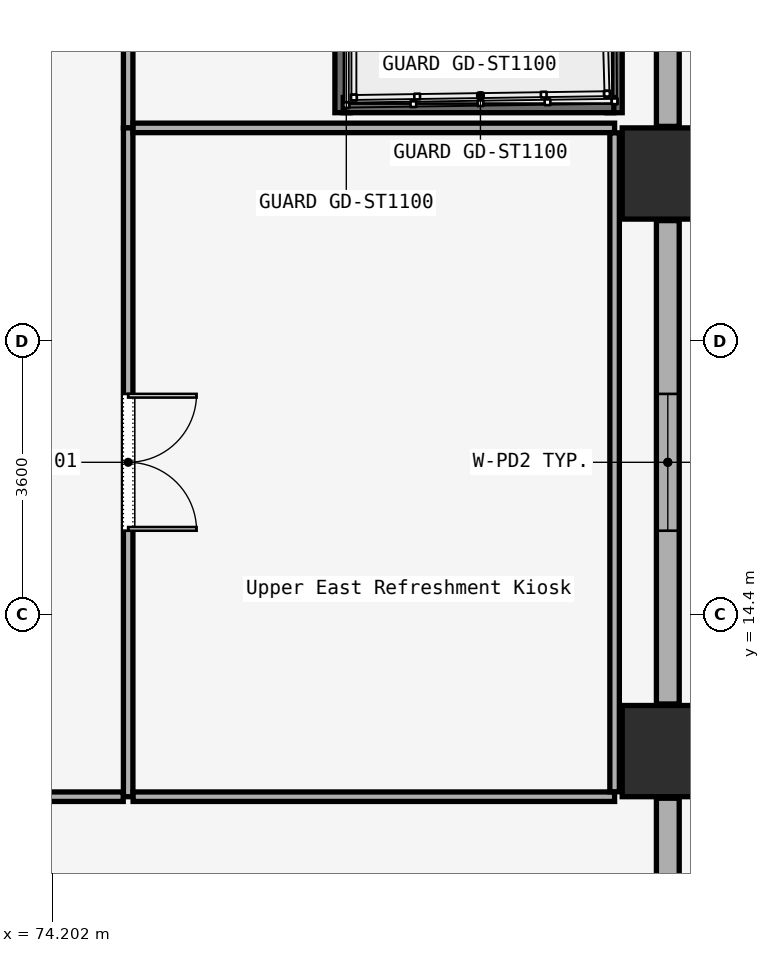
"""IFC4 building model, lengths in metres.
Left out: names, types, materials, properties, quantities, classifications, styles, units other than length and angle.
Written with IfcOpenShell. Run it as: python <this file> out.ifc"""

import sys

from ifc_helpers import new_model, si_unit, direction, frame, frame_2d, origin, origin_2d, place, context, subcontext, project, spatial, rectangle, extrude, element, fill, save


model = new_model("IFC4")
c1 = context("Model", 3, precision=1e-05, world=origin(), true_north=direction((0.0, 1.0)))
c2 = subcontext(c1, "Body", "Model", "MODEL_VIEW")
j1 = project(units=[si_unit("LENGTHUNIT", "METRE"), si_unit("PLANEANGLEUNIT", "RADIAN")], contexts=[c1])
p1 = place(None, origin())
s1 = spatial("IfcSite", under=j1, at=p1, CompositionType="ELEMENT")
p2 = place(p1, origin())
s2 = spatial("IfcBuilding", under=s1, at=p2, CompositionType="ELEMENT")
p3 = place(p2, frame((0.0, 0.0, 18.0)))
s3 = spatial("IfcBuildingStorey", under=s2, at=p3, CompositionType="ELEMENT", Elevation=18.0)
for number, where, z_axis, x_axis in (
    (1, (82.3, 12.6, 0.0), (0.0, 0.0, 1.0), (1.0, 0.0, 0.0)),
    (2, (82.3, 20.2, 0.0), (0.0, 0.0, 1.0), (1.0, 0.0, 0.0)),
):
    element("IfcColumn", number, at=place(p3, frame(where, z_axis=z_axis, x_axis=x_axis)), inside=s3, PredefinedType="COLUMN", context=c2, shape_type="SweptSolid", body=[
        extrude(rectangle(XDim=1.2, YDim=1.2, at=origin_2d()), origin(), (0.0, 0.0, 1.0), 5.7),
    ])
p4 = place(p3, frame((82.3, 11.98, 0.0), z_axis=(0.0, 0.0, 1.0), x_axis=(0.0, -1.0, 0.0)))
e3 = element("IfcWall", 3, at=p4, inside=s3, PredefinedType="SOLIDWALL", context=c2, shape_type="SweptSolid", body=[
    extrude(rectangle(XDim=6.36, YDim=0.3, at=frame_2d((3.18, 0.0))), origin(), (0.0, 0.0, 1.0), 5.7),
])
p5 = place(p4, frame((2.28, 0.0, 1.0)))
e4 = element("IfcOpeningElement", 4, at=p5, cuts=e3, PredefinedType="OPENING", context=c2, shape_type="SweptSolid", body=[
    extrude(rectangle(XDim=1.8, YDim=2.2, at=frame_2d((0.9, 1.1))), frame((0.0, 0.15, 0.0), z_axis=(0.0, -1.0, 0.0), x_axis=(1.0, 0.0, 0.0)), (0.0, 0.0, 1.0), 0.3),
])
p6 = place(p3, frame((82.3, 19.58, 0.0), z_axis=(0.0, 0.0, 1.0), x_axis=(0.0, -1.0, 0.0)))
e5 = element("IfcWall", 5, at=p6, inside=s3, PredefinedType="SOLIDWALL", context=c2, shape_type="SweptSolid", body=[
    extrude(rectangle(XDim=6.36, YDim=0.3, at=frame_2d((3.18, 0.0))), origin(), (0.0, 0.0, 1.0), 5.7),
])
p7 = place(p6, frame((2.28, 0.0, 1.0)))
e6 = element("IfcOpeningElement", 6, at=p7, cuts=e5, PredefinedType="OPENING", context=c2, shape_type="SweptSolid", body=[
    extrude(rectangle(XDim=1.8, YDim=2.2, at=frame_2d((0.9, 1.1))), frame((0.0, 0.15, 0.0), z_axis=(0.0, -1.0, 0.0), x_axis=(1.0, 0.0, 0.0)), (0.0, 0.0, 1.0), 0.3),
])
p8 = place(p3, frame((82.3, 27.18, 0.0), z_axis=(0.0, 0.0, 1.0), x_axis=(0.0, -1.0, 0.0)))
e7 = element("IfcWall", 7, at=p8, inside=s3, PredefinedType="SOLIDWALL", context=c2, shape_type="SweptSolid", body=[
    extrude(rectangle(XDim=6.36, YDim=0.3, at=frame_2d((3.18, 0.0))), origin(), (0.0, 0.0, 1.0), 5.7),
])
p9 = place(p8, frame((2.28, 0.0, 1.0)))
e8 = element("IfcOpeningElement", 8, at=p9, cuts=e7, PredefinedType="OPENING", context=c2, shape_type="SweptSolid", body=[
    extrude(rectangle(XDim=1.8, YDim=2.2, at=frame_2d((0.9, 1.1))), frame((0.0, 0.15, 0.0), z_axis=(0.0, -1.0, 0.0), x_axis=(1.0, 0.0, 0.0)), (0.0, 0.0, 1.0), 0.3),
])
for number, where, z_axis, x_axis in (
    (9, (78.02, 28.95, 0.0), (0.0, 0.0, 1.0), (0.0, -1.0, 0.0)),
    (10, (81.6, 28.95, 0.0), (0.0, 0.0, 1.0), (0.0, -1.0, 0.0)),
):
    element("IfcWall", number, at=place(p3, frame(where, z_axis=z_axis, x_axis=x_axis)), inside=s3, PredefinedType="SOLIDWALL", context=c2, shape_type="SweptSolid", body=[
        extrude(rectangle(XDim=7.95, YDim=0.2, at=frame_2d((3.975, 0.0))), origin(), (0.0, 0.0, 1.0), 6.0),
    ])
p10 = place(p3, frame((78.03, 21.1, 0.0), z_axis=(0.0, 0.0, 1.0), x_axis=(1.0, 0.0, 0.0)))
e11 = element("IfcWall", 11, at=p10, inside=s3, PredefinedType="SOLIDWALL", context=c2, shape_type="SweptSolid", body=[
    extrude(rectangle(XDim=3.56, YDim=0.2, at=frame_2d((1.78, 0.0))), origin(), (0.0, 0.0, 1.0), 6.0),
])
p11 = place(p3, frame((75.2, 43.585, 0.0), z_axis=(0.0, 0.0, 1.0), x_axis=(0.0, -1.0, 0.0)))
e12 = element("IfcWall", 12, at=p11, inside=s3, PredefinedType="PARTITIONING", context=c2, shape_type="SweptSolid", body=[
    extrude(rectangle(XDim=22.785, YDim=0.125, at=frame_2d((11.393, 0.0))), origin(), (0.0, 0.0, 1.0), 4.47),
])
p12 = place(p3, frame((75.2, 20.8, 0.0), z_axis=(0.0, 0.0, 1.0), x_axis=(0.0, -1.0, 0.0)))
e13 = element("IfcWall", 13, at=p12, inside=s3, PredefinedType="PARTITIONING", context=c2, shape_type="SweptSolid", body=[
    extrude(rectangle(XDim=8.8, YDim=0.125, at=frame_2d((4.4, 0.0))), origin(), (0.0, 0.0, 1.0), 4.47),
])
p13 = place(p12, frame((3.5, 0.0, 0.0)))
e14 = element("IfcOpeningElement", 14, at=p13, cuts=e13, PredefinedType="OPENING", context=c2, shape_type="SweptSolid", body=[
    extrude(rectangle(XDim=1.8, YDim=2.3, at=frame_2d((0.9, 1.15))), frame((0.0, 0.062, 0.0), z_axis=(0.0, -1.0, 0.0), x_axis=(1.0, 0.0, 0.0)), (0.0, 0.0, 1.0), 0.125),
])
p14 = place(p3, frame((75.135, 12.0, 0.0), z_axis=(0.0, 0.0, 1.0), x_axis=(-1.0, 0.0, 0.0)))
e15 = element("IfcWall", 15, at=p14, inside=s3, PredefinedType="PARTITIONING", context=c2, shape_type="SweptSolid", body=[
    extrude(rectangle(XDim=5.635, YDim=0.125, at=frame_2d((2.817, 0.0))), origin(), (0.0, 0.0, 1.0), 4.47),
])
for number, where, z_axis, x_axis in (
    (16, (81.6, 12.0, 0.0), (0.0, 0.0, 1.0), (-1.0, 0.0, 0.0)),
    (17, (75.265, 20.8, 0.0), (0.0, 0.0, 1.0), (1.0, 0.0, 0.0)),
):
    element("IfcWall", number, at=place(p3, frame(where, z_axis=z_axis, x_axis=x_axis)), inside=s3, PredefinedType="PARTITIONING", context=c2, shape_type="SweptSolid", body=[
        extrude(rectangle(XDim=6.335, YDim=0.125, at=frame_2d((3.167, 0.0))), origin(), (0.0, 0.0, 1.0), 4.47),
    ])
p15 = place(p3, frame((81.6, 20.735, 0.0), z_axis=(0.0, 0.0, 1.0), x_axis=(0.0, -1.0, 0.0)))
e18 = element("IfcWall", 18, at=p15, inside=s3, PredefinedType="PARTITIONING", context=c2, shape_type="SweptSolid", body=[
    extrude(rectangle(XDim=8.67, YDim=0.125, at=frame_2d((4.335, 0.0))), origin(), (0.0, 0.0, 1.0), 4.47),
])
p16 = place(p7, origin())
e19 = element("IfcWindow", 19, at=p16, inside=s3, PartitioningType="SINGLE_PANEL", PredefinedType="WINDOW", context=c2, shape_type="SweptSolid", body=[
    extrude(rectangle(XDim=1.8, YDim=2.2, at=frame_2d((0.9, 1.1))), frame((0.0, 0.03, 0.0), z_axis=(0.0, -1.0, 0.0), x_axis=(1.0, 0.0, 0.0)), (0.0, 0.0, 1.0), 0.06),
])
fill(e6, e19)
p17 = place(p13, origin())
e20 = element("IfcDoor", 20, at=p17, inside=s3, OperationType="SINGLE_SWING_LEFT", PredefinedType="DOOR", context=c2, shape_type="SweptSolid", body=[
    extrude(rectangle(XDim=1.8, YDim=2.3, at=frame_2d((0.9, 1.15))), frame((0.0, 0.025, 0.0), z_axis=(0.0, -1.0, 0.0), x_axis=(1.0, 0.0, 0.0)), (0.0, 0.0, 1.0), 0.05),
])
fill(e14, e20)
save(model, sys.argv[1])
